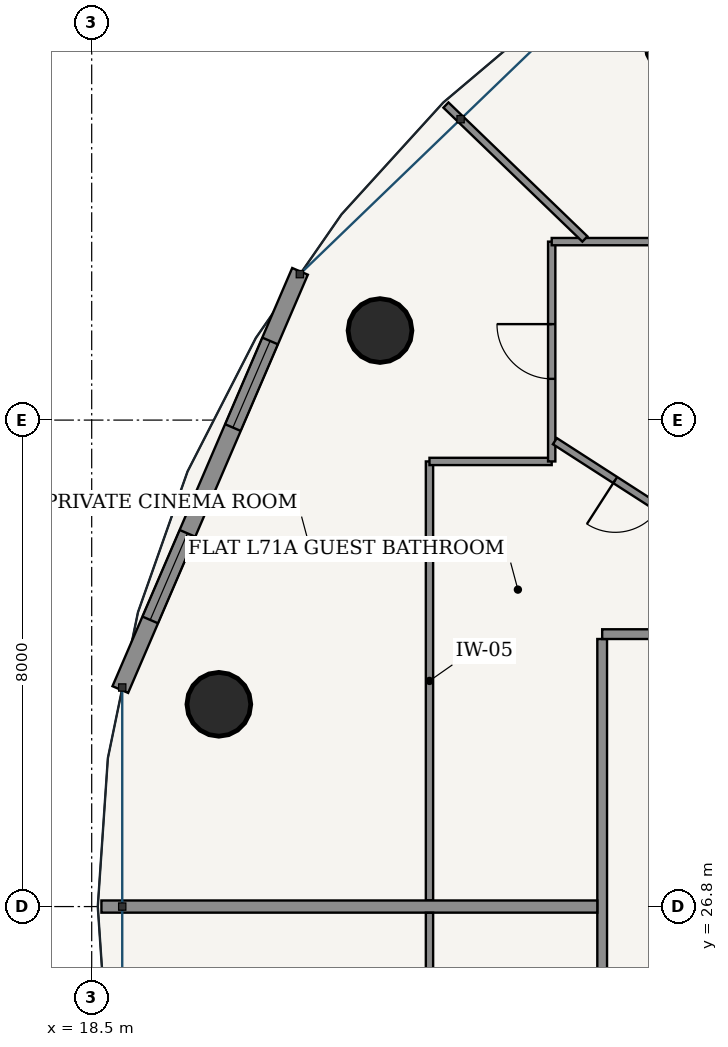
"""IFC4 building model, lengths in metres.
Left out: names, types, materials, properties, quantities, classifications, styles, units other than length and angle.
Written with IfcOpenShell. Run it as: python <this file> out.ifc"""

import sys

from ifc_helpers import new_model, si_unit, direction, frame, frame_2d, origin, origin_2d, place, context, subcontext, project, spatial, rectangle, hollow_circle, extrude, source, transform, mapped, element, fill, save


model = new_model("IFC4")
c1 = context("Model", 3, precision=1e-05, world=origin(), true_north=direction((-0.2419218956, 0.970295726276)))
c2 = subcontext(c1, "Body", "Model", "MODEL_VIEW")
j1 = project(units=[si_unit("LENGTHUNIT", "METRE"), si_unit("PLANEANGLEUNIT", "RADIAN")], contexts=[c1])
p1 = place(None, origin())
s1 = spatial("IfcSite", under=j1, at=p1, CompositionType="ELEMENT")
p2 = place(p1, origin())
s2 = spatial("IfcBuilding", under=s1, at=p2, CompositionType="ELEMENT")
p3 = place(p2, frame((0.0, 0.0, 270.7)))
s3 = spatial("IfcBuildingStorey", under=s2, at=p3, CompositionType="ELEMENT", Elevation=270.7)
for number, where, z_axis, x_axis in (
    (1, (28.139, 40.977, 0.0), (0.0, 0.0, 1.0), (1.0, 0.0, 0.0)),
    (2, (23.241, 36.272, 0.0), (0.0, 0.0, 1.0), (1.0, 0.0, 0.0)),
    (3, (20.591, 30.126, 0.0), (0.0, 0.0, 1.0), (1.0, 0.0, 0.0)),
):
    element("IfcColumn", number, at=place(p3, frame(where, z_axis=z_axis, x_axis=x_axis)), inside=s3, PredefinedType="COLUMN", context=c2, shape_type="SweptSolid", body=[
        extrude(hollow_circle(Radius=0.525, WallThickness=0.035, at=origin_2d()), origin(), (0.0, 0.0, 1.0), 3.75),
    ])
p4 = place(p3, frame((21.926, 37.246, 0.0), z_axis=(0.0, 0.0, 1.0), x_axis=(-0.394816612978, -0.918759948037, 0.0)))
e4 = element("IfcWall", 4, at=p4, inside=s3, PredefinedType="SOLIDWALL", context=c2, shape_type="SweptSolid", body=[
    extrude(rectangle(XDim=7.485, YDim=0.28, at=frame_2d((3.743, 0.0))), origin(), (0.0, 0.0, 1.0), 3.49),
])
p5 = place(p4, frame((1.246, 0.0, 0.85)))
e5 = element("IfcOpeningElement", 5, at=p5, cuts=e4, PredefinedType="OPENING", context=c2, shape_type="SweptSolid", body=[
    extrude(rectangle(XDim=1.55, YDim=1.95, at=frame_2d((0.775, 0.975))), frame((0.0, 0.15, 0.0), z_axis=(0.0, -1.0, 0.0), x_axis=(1.0, 0.0, 0.0)), (0.0, 0.0, 1.0), 0.3),
])
p6 = place(p4, frame((4.689, 0.0, 0.85)))
e6 = element("IfcOpeningElement", 6, at=p6, cuts=e4, PredefinedType="OPENING", context=c2, shape_type="SweptSolid", body=[
    extrude(rectangle(XDim=1.55, YDim=1.95, at=frame_2d((0.775, 0.975))), frame((0.0, 0.15, 0.0), z_axis=(0.0, -1.0, 0.0), x_axis=(1.0, 0.0, 0.0)), (0.0, 0.0, 1.0), 0.3),
])
p7 = place(p3, frame((26.895, 17.275, 0.0), z_axis=(0.0, 0.0, 1.0), x_axis=(0.0, 1.0, 0.0)))
e7 = element("IfcWall", 7, at=p7, inside=s3, PredefinedType="PARTITIONING", context=c2, shape_type="SweptSolid", body=[
    extrude(rectangle(XDim=13.925, YDim=0.16, at=frame_2d((6.962, 0.0))), origin(), (0.0, 0.0, 1.0), 3.015),
])
p8 = place(p7, frame((2.735, 0.0, 0.0)))
e8 = element("IfcOpeningElement", 8, at=p8, cuts=e7, PredefinedType="OPENING", context=c2, shape_type="SweptSolid", body=[
    extrude(rectangle(XDim=0.98, YDim=2.2, at=frame_2d((0.49, 1.1))), frame((0.0, 0.09, 0.0), z_axis=(0.0, -1.0, 0.0), x_axis=(1.0, 0.0, 0.0)), (0.0, 0.0, 1.0), 0.18),
])
p9 = place(p3, frame((26.895, 31.28, 0.0), z_axis=(0.0, 0.0, 1.0), x_axis=(1.0, 0.0, 0.0)))
e9 = element("IfcWall", 9, at=p9, inside=s3, PredefinedType="PARTITIONING", context=c2, shape_type="SweptSolid", body=[
    extrude(rectangle(XDim=1.93, YDim=0.16, at=frame_2d((0.965, 0.0))), origin(), (0.0, 0.0, 1.0), 3.49),
])
p10 = place(p3, frame((24.055, 26.902, 0.0), z_axis=(0.0, 0.0, 1.0), x_axis=(0.0, 1.0, 0.0)))
e10 = element("IfcWall", 10, at=p10, inside=s3, PredefinedType="PARTITIONING", context=c2, shape_type="SweptSolid", body=[
    extrude(rectangle(XDim=7.218, YDim=0.12, at=frame_2d((3.609, 0.0))), origin(), (0.0, 0.0, 1.0), 3.015),
])
p11 = place(p3, frame((24.055, 34.12, 0.0), z_axis=(0.0, 0.0, 1.0), x_axis=(1.0, 0.0, 0.0)))
e11 = element("IfcWall", 11, at=p11, inside=s3, PredefinedType="PARTITIONING", context=c2, shape_type="SweptSolid", body=[
    extrude(rectangle(XDim=2.01, YDim=0.12, at=frame_2d((1.005, 0.0))), origin(), (0.0, 0.0, 1.0), 3.209),
])
p12 = place(p3, frame((26.065, 34.12, 0.0), z_axis=(0.0, 0.0, 1.0), x_axis=(0.0, 1.0, 0.0)))
e12 = element("IfcWall", 12, at=p12, inside=s3, PredefinedType="PARTITIONING", context=c2, shape_type="SweptSolid", body=[
    extrude(rectangle(XDim=3.615, YDim=0.12, at=frame_2d((1.808, 0.0))), origin(), (0.0, 0.0, 1.0), 3.015),
])
p13 = place(p12, frame((1.358, 0.0, 0.0)))
e13 = element("IfcOpeningElement", 13, at=p13, cuts=e12, PredefinedType="OPENING", context=c2, shape_type="SweptSolid", body=[
    extrude(rectangle(XDim=0.9, YDim=2.15, at=frame_2d((0.45, 1.075))), frame((0.0, 0.07, 0.0), z_axis=(0.0, -1.0, 0.0), x_axis=(1.0, 0.0, 0.0)), (0.0, 0.0, 1.0), 0.14),
])
p14 = place(p3, frame((26.065, 37.735, 0.0), z_axis=(0.0, 0.0, 1.0), x_axis=(1.0, 0.0, 0.0)))
e14 = element("IfcWall", 14, at=p14, inside=s3, PredefinedType="PARTITIONING", context=c2, shape_type="SweptSolid", body=[
    extrude(rectangle(XDim=23.87, YDim=0.12, at=frame_2d((11.935, 0.0))), origin(), (0.0, 0.0, 1.0), 3.015),
])
p15 = place(p14, frame((18.46, 0.0, 0.0)))
e15 = element("IfcOpeningElement", 15, at=p15, cuts=e14, PredefinedType="OPENING", context=c2, shape_type="SweptSolid", body=[
    extrude(rectangle(XDim=0.9, YDim=2.15, at=frame_2d((0.45, 1.075))), frame((0.0, 0.07, 0.0), z_axis=(0.0, -1.0, 0.0), x_axis=(1.0, 0.0, 0.0)), (0.0, 0.0, 1.0), 0.14),
])
p16 = place(p14, frame((3.144, 0.0, 0.0)))
e16 = element("IfcOpeningElement", 16, at=p16, cuts=e14, PredefinedType="OPENING", context=c2, shape_type="SweptSolid", body=[
    extrude(rectangle(XDim=0.9, YDim=2.15, at=frame_2d((0.45, 1.075))), frame((0.0, 0.07, 0.0), z_axis=(0.0, -1.0, 0.0), x_axis=(1.0, 0.0, 0.0)), (0.0, 0.0, 1.0), 0.14),
])
p17 = place(p3, frame((26.611, 37.778, 0.0), z_axis=(0.0, 0.0, 1.0), x_axis=(-0.719985652574, 0.693988948102, 0.0)))
e17 = element("IfcWall", 17, at=p17, inside=s3, PredefinedType="PARTITIONING", context=c2, shape_type="SweptSolid", body=[
    extrude(rectangle(XDim=3.174, YDim=0.12, at=frame_2d((1.587, 0.0))), origin(), (0.0, 0.0, 1.0), 3.121),
])
p18 = place(p3, frame((28.825, 32.709, 0.0), z_axis=(0.0, 0.0, 1.0), x_axis=(-0.840692964871, 0.541512085568, 0.0)))
e18 = element("IfcWall", 18, at=p18, inside=s3, PredefinedType="PARTITIONING", context=c2, shape_type="SweptSolid", body=[
    extrude(rectangle(XDim=3.221, YDim=0.12, at=frame_2d((1.61, 0.0))), origin(), (0.0, 0.0, 1.0), 3.015),
])
p19 = place(p18, frame((1.18, 0.0, 0.0)))
e19 = element("IfcOpeningElement", 19, at=p19, cuts=e18, PredefinedType="OPENING", context=c2, shape_type="SweptSolid", body=[
    extrude(rectangle(XDim=0.86, YDim=2.15, at=frame_2d((0.43, 1.075))), frame((0.0, 0.07, 0.0), z_axis=(0.0, -1.0, 0.0), x_axis=(1.0, 0.0, 0.0)), (0.0, 0.0, 1.0), 0.14),
])
p20 = place(p3, frame((26.815, 26.8, 0.0), z_axis=(0.0, 0.0, 1.0), x_axis=(-1.0, 0.0, 0.0)))
e20 = element("IfcWall", 20, at=p20, inside=s3, PredefinedType="PARTITIONING", context=c2, shape_type="SweptSolid", body=[
    extrude(rectangle(XDim=8.155, YDim=0.2, at=frame_2d((4.078, 0.0))), origin(), (0.0, 0.0, 1.0), 3.121),
])
p21 = place(p3, frame((24.055, 14.355, 0.0), z_axis=(0.0, 0.0, 1.0), x_axis=(0.0, 1.0, 0.0)))
e21 = element("IfcWall", 21, at=p21, inside=s3, PredefinedType="PARTITIONING", context=c2, shape_type="SweptSolid", body=[
    extrude(rectangle(XDim=12.343, YDim=0.12, at=frame_2d((6.171, 0.0))), origin(), (0.0, 0.0, 1.0), 3.015),
])
p22 = place(p21, frame((5.442, 0.0, 0.0)))
e22 = element("IfcOpeningElement", 22, at=p22, cuts=e21, PredefinedType="OPENING", context=c2, shape_type="SweptSolid", body=[
    extrude(rectangle(XDim=0.9, YDim=2.15, at=frame_2d((0.45, 1.075))), frame((0.0, 0.07, 0.0), z_axis=(0.0, -1.0, 0.0), x_axis=(1.0, 0.0, 0.0)), (0.0, 0.0, 1.0), 0.14),
])
m1 = source(origin(), c2, "Body", "SweptSolid", [
    extrude(rectangle(XDim=1.55, YDim=1.95, at=frame_2d((0.775, 0.975))), frame((0.0, 0.03, 0.0), z_axis=(0.0, -1.0, 0.0), x_axis=(1.0, 0.0, 0.0)), (0.0, 0.0, 1.0), 0.06),
])
p23 = place(p5, origin())
e23 = element("IfcWindow", 23, at=p23, inside=s3, PartitioningType="SINGLE_PANEL", PredefinedType="WINDOW", context=c2, shape_type="MappedRepresentation", body=[
    mapped(m1, transform((0.0, 0.0, 0.0), scale=1.0)),
])
fill(e5, e23)
p24 = place(p6, origin())
e24 = element("IfcWindow", 24, at=p24, inside=s3, PartitioningType="SINGLE_PANEL", PredefinedType="WINDOW", context=c2, shape_type="MappedRepresentation", body=[
    mapped(m1, transform((0.0, 0.0, 0.0), scale=1.0)),
])
fill(e6, e24)
m2 = source(origin(), c2, "Body", "SweptSolid", [
    extrude(rectangle(XDim=0.86, YDim=2.15, at=frame_2d((0.43, 1.075))), frame((0.0, 0.025, 0.0), z_axis=(0.0, -1.0, 0.0), x_axis=(1.0, 0.0, 0.0)), (0.0, 0.0, 1.0), 0.05),
])
p25 = place(p19, origin())
e25 = element("IfcDoor", 25, at=p25, inside=s3, OperationType="SINGLE_SWING_RIGHT", PredefinedType="DOOR", context=c2, shape_type="MappedRepresentation", body=[
    mapped(m2, transform((0.0, 0.0, 0.0), scale=1.0)),
])
fill(e19, e25)
m3 = source(origin(), c2, "Body", "SweptSolid", [
    extrude(rectangle(XDim=0.9, YDim=2.15, at=frame_2d((0.45, 1.075))), frame((0.0, 0.025, 0.0), z_axis=(0.0, -1.0, 0.0), x_axis=(1.0, 0.0, 0.0)), (0.0, 0.0, 1.0), 0.05),
])
p26 = place(p13, origin())
e26 = element("IfcDoor", 26, at=p26, inside=s3, OperationType="SINGLE_SWING_RIGHT", PredefinedType="DOOR", context=c2, shape_type="MappedRepresentation", body=[
    mapped(m3, transform((0.0, 0.0, 0.0), scale=1.0)),
])
fill(e13, e26)
save(model, sys.argv[1])
